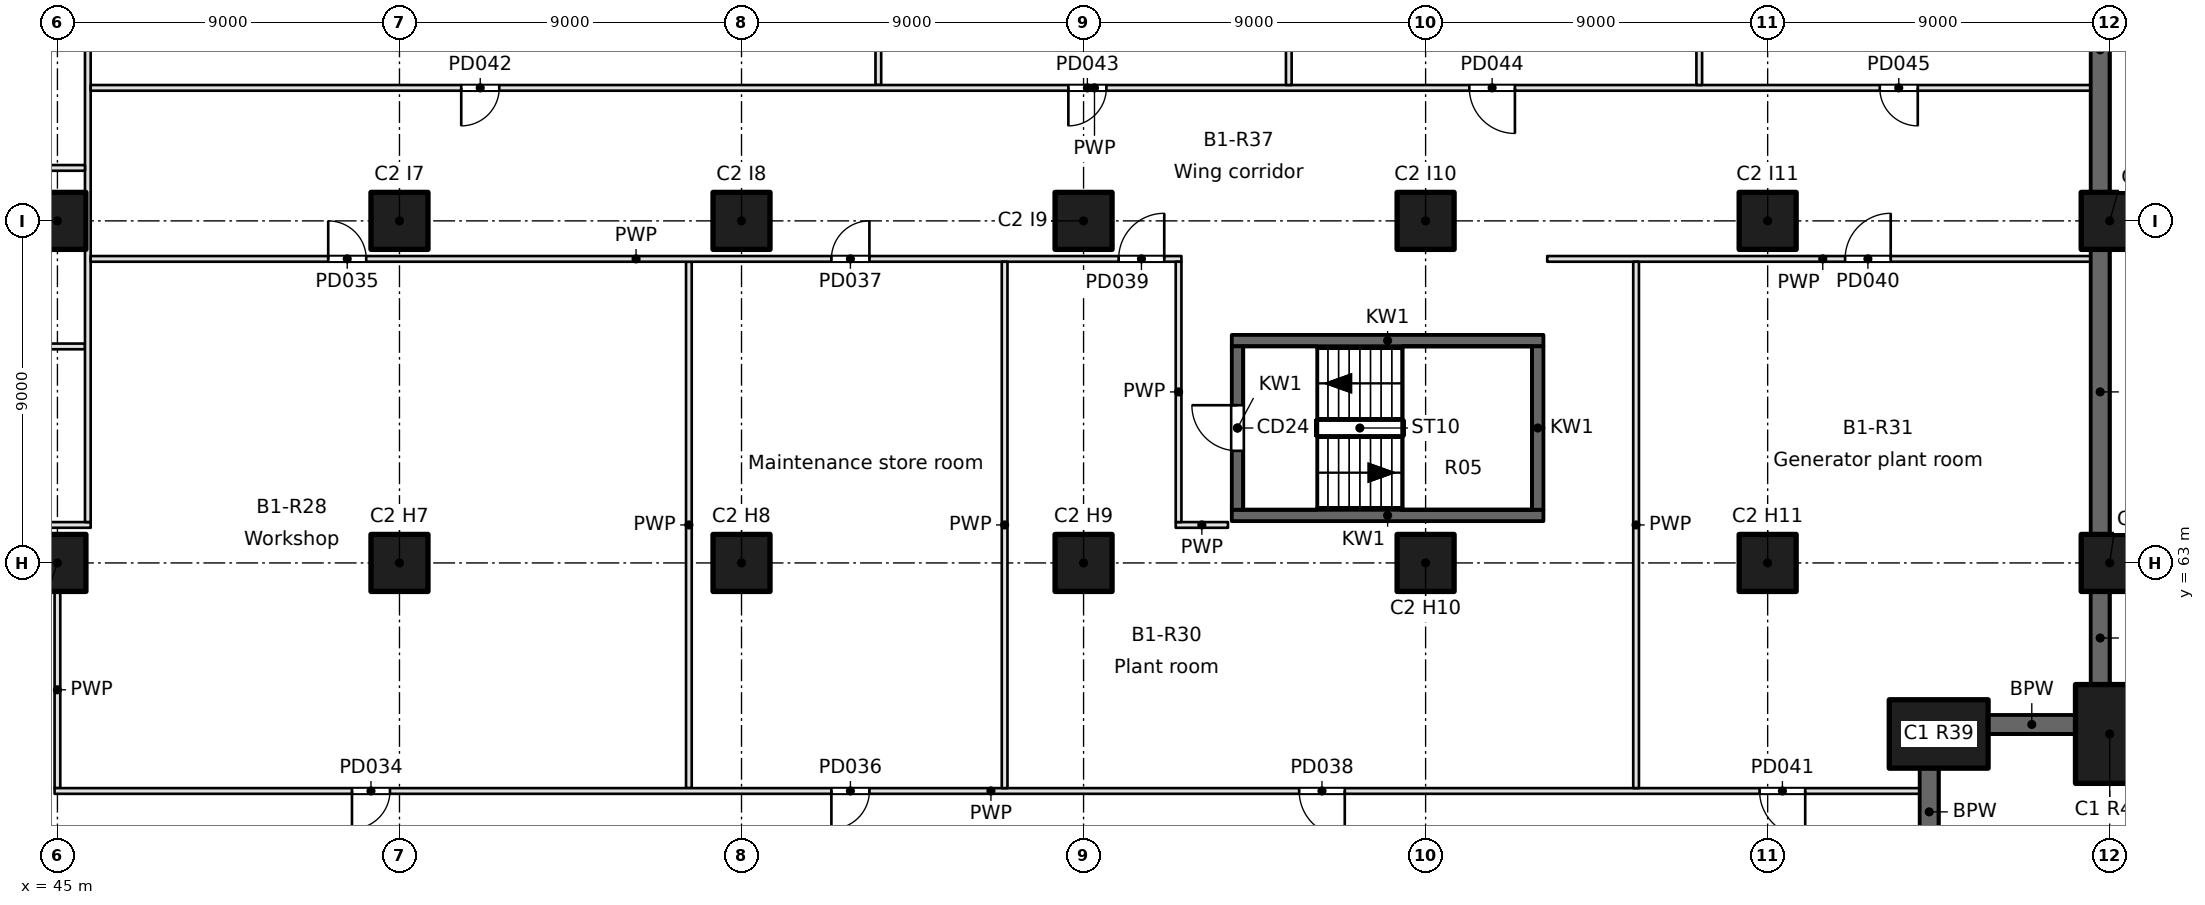
"""IFC4 building model, lengths in metres.
Left out: names, types, materials, properties, quantities, classifications, styles, units other than length and angle.
Written with IfcOpenShell. Run it as: python <this file> out.ifc"""

import sys

from ifc_helpers import new_model, si_unit, direction, frame, frame_2d, origin, origin_2d, place, context, subcontext, project, spatial, rectangle, extrude, element, fill, save


model = new_model("IFC4")
c1 = context("Model", 3, precision=1e-05, world=origin(), true_north=direction((0.0, 1.0)))
c2 = subcontext(c1, "Body", "Model", "MODEL_VIEW")
j1 = project(units=[si_unit("LENGTHUNIT", "METRE"), si_unit("PLANEANGLEUNIT", "RADIAN")], contexts=[c1])
p1 = place(None, origin())
s1 = spatial("IfcSite", under=j1, at=p1, CompositionType="ELEMENT")
p2 = place(p1, origin())
s2 = spatial("IfcBuilding", under=s1, at=p2, CompositionType="ELEMENT")
p3 = place(p2, frame((0.0, 0.0, -6.0)))
s3 = spatial("IfcBuildingStorey", under=s2, at=p3, CompositionType="ELEMENT", Elevation=-6.0)
for number, where, z_axis, x_axis in (
    (1, (94.5, 58.5, -0.6), (0.0, 0.0, 1.0), (1.0, 0.0, 0.0)),
    (2, (99.0, 58.5, -0.6), (0.0, 0.0, 1.0), (0.0, 1.0, 0.0)),
):
    element("IfcColumn", number, at=place(p3, frame(where, z_axis=z_axis, x_axis=x_axis)), inside=s3, PredefinedType="COLUMN", context=c2, shape_type="SweptSolid", body=[
        extrude(rectangle(XDim=2.6, YDim=1.8, at=origin_2d()), origin(), (0.0, 0.0, 1.0), 6.6),
    ])
for number, where, z_axis, x_axis in (
    (3, (99.0, 63.0, -0.6), (0.0, 0.0, 1.0), (1.0, 0.0, 0.0)),
    (4, (99.0, 72.0, -0.6), (0.0, 0.0, 1.0), (1.0, 0.0, 0.0)),
    (5, (45.0, 63.0, -0.6), (0.0, 0.0, 1.0), (1.0, 0.0, 0.0)),
    (6, (45.0, 72.0, -0.6), (0.0, 0.0, 1.0), (1.0, 0.0, 0.0)),
    (7, (54.0, 63.0, -0.6), (0.0, 0.0, 1.0), (1.0, 0.0, 0.0)),
    (8, (54.0, 72.0, -0.6), (0.0, 0.0, 1.0), (1.0, 0.0, 0.0)),
    (9, (63.0, 63.0, -0.6), (0.0, 0.0, 1.0), (1.0, 0.0, 0.0)),
    (10, (63.0, 72.0, -0.6), (0.0, 0.0, 1.0), (1.0, 0.0, 0.0)),
    (11, (72.0, 63.0, -0.6), (0.0, 0.0, 1.0), (1.0, 0.0, 0.0)),
    (12, (72.0, 72.0, -0.6), (0.0, 0.0, 1.0), (1.0, 0.0, 0.0)),
    (13, (81.0, 63.0, -0.6), (0.0, 0.0, 1.0), (1.0, 0.0, 0.0)),
    (14, (81.0, 72.0, -0.6), (0.0, 0.0, 1.0), (1.0, 0.0, 0.0)),
    (15, (90.0, 63.0, -0.6), (0.0, 0.0, 1.0), (1.0, 0.0, 0.0)),
    (16, (90.0, 72.0, -0.6), (0.0, 0.0, 1.0), (1.0, 0.0, 0.0)),
):
    element("IfcColumn", number, at=place(p3, frame(where, z_axis=z_axis, x_axis=x_axis)), inside=s3, PredefinedType="COLUMN", context=c2, shape_type="SweptSolid", body=[
        extrude(rectangle(XDim=1.5, YDim=1.5, at=origin_2d()), origin(), (0.0, 0.0, 1.0), 6.6),
    ])
for number, where, z_axis, x_axis in (
    (17, (75.9, 64.25, 0.0), (0.0, 0.0, 1.0), (1.0, 0.0, 0.0)),
    (18, (75.9, 68.85, 0.0), (0.0, 0.0, 1.0), (1.0, 0.0, 0.0)),
):
    element("IfcWall", number, at=place(p3, frame(where, z_axis=z_axis, x_axis=x_axis)), inside=s3, PredefinedType="SOLIDWALL", context=c2, shape_type="SweptSolid", body=[
        extrude(rectangle(XDim=8.2, YDim=0.3, at=frame_2d((4.1, 0.0))), origin(), (0.0, 0.0, 1.0), 5.6),
    ])
p4 = place(p3, frame((76.05, 64.4, 0.0), z_axis=(0.0, 0.0, 1.0), x_axis=(0.0, 1.0, 0.0)))
e19 = element("IfcWall", 19, at=p4, inside=s3, PredefinedType="SOLIDWALL", context=c2, shape_type="SweptSolid", body=[
    extrude(rectangle(XDim=4.3, YDim=0.3, at=frame_2d((2.15, 0.0))), origin(), (0.0, 0.0, 1.0), 5.6),
])
p5 = place(p4, frame((1.55, 0.0, 0.0)))
e20 = element("IfcOpeningElement", 20, at=p5, cuts=e19, PredefinedType="OPENING", context=c2, shape_type="SweptSolid", body=[
    extrude(rectangle(XDim=1.2, YDim=2.1, at=frame_2d((0.6, 1.05))), frame((0.0, 0.15, 0.0), z_axis=(0.0, -1.0, 0.0), x_axis=(1.0, 0.0, 0.0)), (0.0, 0.0, 1.0), 0.3),
])
p6 = place(p3, frame((83.95, 64.4, 0.0), z_axis=(0.0, 0.0, 1.0), x_axis=(0.0, 1.0, 0.0)))
e21 = element("IfcWall", 21, at=p6, inside=s3, PredefinedType="SOLIDWALL", context=c2, shape_type="SweptSolid", body=[
    extrude(rectangle(XDim=4.3, YDim=0.3, at=frame_2d((2.15, 0.0))), origin(), (0.0, 0.0, 1.0), 5.6),
])
for number, where, z_axis, x_axis in (
    (22, (94.25, 55.3, 0.0), (0.0, 0.0, 1.0), (0.0, 1.0, 0.0)),
    (23, (95.8, 58.75, 0.0), (0.0, 0.0, 1.0), (1.0, 0.0, 0.0)),
):
    element("IfcWall", number, at=place(p3, frame(where, z_axis=z_axis, x_axis=x_axis)), inside=s3, PredefinedType="SOLIDWALL", context=c2, shape_type="SweptSolid", body=[
        extrude(rectangle(XDim=2.3, YDim=0.5, at=frame_2d((1.15, 0.0))), origin(), (0.0, 0.0, 1.0), 5.6),
    ])
p7 = place(p3, frame((98.75, 59.8, 0.0), z_axis=(0.0, 0.0, 1.0), x_axis=(0.0, 1.0, 0.0)))
e24 = element("IfcWall", 24, at=p7, inside=s3, PredefinedType="SOLIDWALL", context=c2, shape_type="SweptSolid", body=[
    extrude(rectangle(XDim=2.45, YDim=0.5, at=frame_2d((1.225, 0.0))), origin(), (0.0, 0.0, 1.0), 5.6),
])
for number, where, z_axis, x_axis in (
    (25, (98.75, 63.75, 0.0), (0.0, 0.0, 1.0), (0.0, 1.0, 0.0)),
    (26, (98.75, 72.75, 0.0), (0.0, 0.0, 1.0), (0.0, 1.0, 0.0)),
):
    element("IfcWall", number, at=place(p3, frame(where, z_axis=z_axis, x_axis=x_axis)), inside=s3, PredefinedType="SOLIDWALL", context=c2, shape_type="SweptSolid", body=[
        extrude(rectangle(XDim=7.5, YDim=0.5, at=frame_2d((3.75, 0.0))), origin(), (0.0, 0.0, 1.0), 5.6),
    ])
p8 = place(p3, frame((45.0, 57.075, 0.0), z_axis=(0.0, 0.0, 1.0), x_axis=(0.0, 1.0, 0.0)))
e27 = element("IfcWall", 27, at=p8, inside=s3, PredefinedType="PARTITIONING", context=c2, shape_type="SweptSolid", body=[
    extrude(rectangle(XDim=5.175, YDim=0.15, at=frame_2d((2.587, 0.0))), origin(), (0.0, 0.0, 1.0), 5.6),
])
p9 = place(p3, frame((40.575, 68.697, 0.0), z_axis=(0.0, 0.0, 1.0), x_axis=(1.0, 0.0, 0.0)))
e28 = element("IfcWall", 28, at=p9, inside=s3, PredefinedType="PARTITIONING", context=c2, shape_type="SweptSolid", body=[
    extrude(rectangle(XDim=5.15, YDim=0.15, at=frame_2d((2.575, 0.0))), origin(), (0.0, 0.0, 1.0), 5.6),
])
p10 = place(p3, frame((45.875, 64.0, 0.0), z_axis=(0.0, 0.0, 1.0), x_axis=(-1.0, 0.0, 0.0)))
e29 = element("IfcWall", 29, at=p10, inside=s3, PredefinedType="PARTITIONING", context=c2, shape_type="SweptSolid", body=[
    extrude(rectangle(XDim=5.45, YDim=0.15, at=frame_2d((2.725, 0.0))), origin(), (0.0, 0.0, 1.0), 5.6),
])
p11 = place(p3, frame((74.425, 64.0, 0.0), z_axis=(0.0, 0.0, 1.0), x_axis=(1.0, 0.0, 0.0)))
e30 = element("IfcWall", 30, at=p11, inside=s3, PredefinedType="PARTITIONING", context=c2, shape_type="SweptSolid", body=[
    extrude(rectangle(XDim=1.375, YDim=0.15, at=frame_2d((0.688, 0.0))), origin(), (0.0, 0.0, 1.0), 5.6),
])
p12 = place(p3, frame((45.8, 64.075, 0.0), z_axis=(0.0, 0.0, 1.0), x_axis=(0.0, 1.0, 0.0)))
e31 = element("IfcWall", 31, at=p12, inside=s3, PredefinedType="PARTITIONING", context=c2, shape_type="SweptSolid", body=[
    extrude(rectangle(XDim=34.025, YDim=0.15, at=frame_2d((17.013, 0.0))), origin(), (0.0, 0.0, 1.0), 5.6),
])
p13 = place(p3, frame((40.575, 73.394, 0.0), z_axis=(0.0, 0.0, 1.0), x_axis=(1.0, 0.0, 0.0)))
e32 = element("IfcWall", 32, at=p13, inside=s3, PredefinedType="PARTITIONING", context=c2, shape_type="SweptSolid", body=[
    extrude(rectangle(XDim=5.15, YDim=0.15, at=frame_2d((2.575, 0.0))), origin(), (0.0, 0.0, 1.0), 5.6),
])
p14 = place(p3, frame((61.615, 57.075, 0.0), z_axis=(0.0, 0.0, 1.0), x_axis=(0.0, 1.0, 0.0)))
e33 = element("IfcWall", 33, at=p14, inside=s3, PredefinedType="PARTITIONING", context=c2, shape_type="SweptSolid", body=[
    extrude(rectangle(XDim=13.85, YDim=0.15, at=frame_2d((6.925, 0.0))), origin(), (0.0, 0.0, 1.0), 5.6),
])
p15 = place(p3, frame((94.2, 57.0, 0.0), z_axis=(0.0, 0.0, 1.0), x_axis=(-1.0, 0.0, 0.0)))
e34 = element("IfcWall", 34, at=p15, inside=s3, PredefinedType="PARTITIONING", context=c2, shape_type="SweptSolid", body=[
    extrude(rectangle(XDim=49.275, YDim=0.15, at=frame_2d((24.637, 0.0))), origin(), (0.0, 0.0, 1.0), 5.6),
])
p16 = place(p15, frame((40.45, 0.0, 0.0)))
e35 = element("IfcOpeningElement", 35, at=p16, cuts=e34, PredefinedType="OPENING", context=c2, shape_type="SweptSolid", body=[
    extrude(rectangle(XDim=1.0, YDim=2.1, at=frame_2d((0.5, 1.05))), frame((0.0, 0.075, 0.0), z_axis=(0.0, -1.0, 0.0), x_axis=(1.0, 0.0, 0.0)), (0.0, 0.0, 1.0), 0.15),
])
p17 = place(p15, frame((27.835, 0.0, 0.0)))
e36 = element("IfcOpeningElement", 36, at=p17, cuts=e34, PredefinedType="OPENING", context=c2, shape_type="SweptSolid", body=[
    extrude(rectangle(XDim=1.0, YDim=2.1, at=frame_2d((0.5, 1.05))), frame((0.0, 0.075, 0.0), z_axis=(0.0, -1.0, 0.0), x_axis=(1.0, 0.0, 0.0)), (0.0, 0.0, 1.0), 0.15),
])
p18 = place(p15, frame((15.327, 0.0, 0.0)))
e37 = element("IfcOpeningElement", 37, at=p18, cuts=e34, PredefinedType="OPENING", context=c2, shape_type="SweptSolid", body=[
    extrude(rectangle(XDim=1.2, YDim=2.1, at=frame_2d((0.6, 1.05))), frame((0.0, 0.075, 0.0), z_axis=(0.0, -1.0, 0.0), x_axis=(1.0, 0.0, 0.0)), (0.0, 0.0, 1.0), 0.15),
])
p19 = place(p15, frame((3.212, 0.0, 0.0)))
e38 = element("IfcOpeningElement", 38, at=p19, cuts=e34, PredefinedType="OPENING", context=c2, shape_type="SweptSolid", body=[
    extrude(rectangle(XDim=1.2, YDim=2.1, at=frame_2d((0.6, 1.05))), frame((0.0, 0.075, 0.0), z_axis=(0.0, -1.0, 0.0), x_axis=(1.0, 0.0, 0.0)), (0.0, 0.0, 1.0), 0.15),
])
p20 = place(p3, frame((45.875, 71.0, 0.0), z_axis=(0.0, 0.0, 1.0), x_axis=(1.0, 0.0, 0.0)))
e39 = element("IfcWall", 39, at=p20, inside=s3, PredefinedType="PARTITIONING", context=c2, shape_type="SweptSolid", body=[
    extrude(rectangle(XDim=28.7, YDim=0.15, at=frame_2d((14.35, 0.0))), origin(), (0.0, 0.0, 1.0), 5.6),
])
p21 = place(p20, frame((6.25, 0.0, 0.0)))
e40 = element("IfcOpeningElement", 40, at=p21, cuts=e39, PredefinedType="OPENING", context=c2, shape_type="SweptSolid", body=[
    extrude(rectangle(XDim=1.0, YDim=2.1, at=frame_2d((0.5, 1.05))), frame((0.0, 0.075, 0.0), z_axis=(0.0, -1.0, 0.0), x_axis=(1.0, 0.0, 0.0)), (0.0, 0.0, 1.0), 0.15),
])
p22 = place(p20, frame((19.49, 0.0, 0.0)))
e41 = element("IfcOpeningElement", 41, at=p22, cuts=e39, PredefinedType="OPENING", context=c2, shape_type="SweptSolid", body=[
    extrude(rectangle(XDim=1.0, YDim=2.1, at=frame_2d((0.5, 1.05))), frame((0.0, 0.075, 0.0), z_axis=(0.0, -1.0, 0.0), x_axis=(1.0, 0.0, 0.0)), (0.0, 0.0, 1.0), 0.15),
])
p23 = place(p20, frame((27.048, 0.0, 0.0)))
e42 = element("IfcOpeningElement", 42, at=p23, cuts=e39, PredefinedType="OPENING", context=c2, shape_type="SweptSolid", body=[
    extrude(rectangle(XDim=1.2, YDim=2.1, at=frame_2d((0.6, 1.05))), frame((0.0, 0.075, 0.0), z_axis=(0.0, -1.0, 0.0), x_axis=(1.0, 0.0, 0.0)), (0.0, 0.0, 1.0), 0.15),
])
p24 = place(p3, frame((84.2, 71.0, 0.0), z_axis=(0.0, 0.0, 1.0), x_axis=(1.0, 0.0, 0.0)))
e43 = element("IfcWall", 43, at=p24, inside=s3, PredefinedType="PARTITIONING", context=c2, shape_type="SweptSolid", body=[
    extrude(rectangle(XDim=14.5, YDim=0.15, at=frame_2d((7.25, 0.0))), origin(), (0.0, 0.0, 1.0), 5.6),
])
p25 = place(p24, frame((7.838, 0.0, 0.0)))
e44 = element("IfcOpeningElement", 44, at=p25, cuts=e43, PredefinedType="OPENING", context=c2, shape_type="SweptSolid", body=[
    extrude(rectangle(XDim=1.2, YDim=2.1, at=frame_2d((0.6, 1.05))), frame((0.0, 0.075, 0.0), z_axis=(0.0, -1.0, 0.0), x_axis=(1.0, 0.0, 0.0)), (0.0, 0.0, 1.0), 0.15),
])
for number, where, z_axis, x_axis in (
    (45, (69.923, 57.075, 0.0), (0.0, 0.0, 1.0), (0.0, 1.0, 0.0)),
    (46, (86.538, 57.075, 0.0), (0.0, 0.0, 1.0), (0.0, 1.0, 0.0)),
):
    element("IfcWall", number, at=place(p3, frame(where, z_axis=z_axis, x_axis=x_axis)), inside=s3, PredefinedType="PARTITIONING", context=c2, shape_type="SweptSolid", body=[
        extrude(rectangle(XDim=13.85, YDim=0.15, at=frame_2d((6.925, 0.0))), origin(), (0.0, 0.0, 1.0), 5.6),
    ])
p26 = place(p3, frame((74.5, 70.925, 0.0), z_axis=(0.0, 0.0, 1.0), x_axis=(0.0, -1.0, 0.0)))
e47 = element("IfcWall", 47, at=p26, inside=s3, PredefinedType="PARTITIONING", context=c2, shape_type="SweptSolid", body=[
    extrude(rectangle(XDim=6.85, YDim=0.15, at=frame_2d((3.425, 0.0))), origin(), (0.0, 0.0, 1.0), 5.6),
])
p27 = place(p3, frame((66.6, 75.575, 0.0), z_axis=(0.0, 0.0, 1.0), x_axis=(0.0, 1.0, 0.0)))
e48 = element("IfcWall", 48, at=p27, inside=s3, PredefinedType="PARTITIONING", context=c2, shape_type="SweptSolid", body=[
    extrude(rectangle(XDim=22.525, YDim=0.15, at=frame_2d((11.263, 0.0))), origin(), (0.0, 0.0, 1.0), 5.6),
])
p28 = place(p3, frame((98.7, 75.5, 0.0), z_axis=(0.0, 0.0, 1.0), x_axis=(-1.0, 0.0, 0.0)))
e49 = element("IfcWall", 49, at=p28, inside=s3, PredefinedType="PARTITIONING", context=c2, shape_type="SweptSolid", body=[
    extrude(rectangle(XDim=52.825, YDim=0.15, at=frame_2d((26.413, 0.0))), origin(), (0.0, 0.0, 1.0), 5.6),
])
p29 = place(p28, frame((42.075, 0.0, 0.0)))
e50 = element("IfcOpeningElement", 50, at=p29, cuts=e49, PredefinedType="OPENING", context=c2, shape_type="SweptSolid", body=[
    extrude(rectangle(XDim=1.0, YDim=2.1, at=frame_2d((0.5, 1.05))), frame((0.0, 0.075, 0.0), z_axis=(0.0, -1.0, 0.0), x_axis=(1.0, 0.0, 0.0)), (0.0, 0.0, 1.0), 0.15),
])
p30 = place(p28, frame((26.1, 0.0, 0.0)))
e51 = element("IfcOpeningElement", 51, at=p30, cuts=e49, PredefinedType="OPENING", context=c2, shape_type="SweptSolid", body=[
    extrude(rectangle(XDim=1.0, YDim=2.1, at=frame_2d((0.5, 1.05))), frame((0.0, 0.075, 0.0), z_axis=(0.0, -1.0, 0.0), x_axis=(1.0, 0.0, 0.0)), (0.0, 0.0, 1.0), 0.15),
])
p31 = place(p28, frame((15.35, 0.0, 0.0)))
e52 = element("IfcOpeningElement", 52, at=p31, cuts=e49, PredefinedType="OPENING", context=c2, shape_type="SweptSolid", body=[
    extrude(rectangle(XDim=1.2, YDim=2.1, at=frame_2d((0.6, 1.05))), frame((0.0, 0.075, 0.0), z_axis=(0.0, -1.0, 0.0), x_axis=(1.0, 0.0, 0.0)), (0.0, 0.0, 1.0), 0.15),
])
p32 = place(p28, frame((4.75, 0.0, 0.0)))
e53 = element("IfcOpeningElement", 53, at=p32, cuts=e49, PredefinedType="OPENING", context=c2, shape_type="SweptSolid", body=[
    extrude(rectangle(XDim=1.0, YDim=2.1, at=frame_2d((0.5, 1.05))), frame((0.0, 0.075, 0.0), z_axis=(0.0, -1.0, 0.0), x_axis=(1.0, 0.0, 0.0)), (0.0, 0.0, 1.0), 0.15),
])
p33 = place(p3, frame((77.4, 75.575, 0.0), z_axis=(0.0, 0.0, 1.0), x_axis=(0.0, 1.0, 0.0)))
e54 = element("IfcWall", 54, at=p33, inside=s3, PredefinedType="PARTITIONING", context=c2, shape_type="SweptSolid", body=[
    extrude(rectangle(XDim=22.525, YDim=0.15, at=frame_2d((11.263, 0.0))), origin(), (0.0, 0.0, 1.0), 5.6),
])
p34 = place(p3, frame((88.2, 75.575, 0.0), z_axis=(0.0, 0.0, 1.0), x_axis=(0.0, 1.0, 0.0)))
e55 = element("IfcWall", 55, at=p34, inside=s3, PredefinedType="PARTITIONING", context=c2, shape_type="SweptSolid", body=[
    extrude(rectangle(XDim=17.925, YDim=0.15, at=frame_2d((8.962, 0.0))), origin(), (0.0, 0.0, 1.0), 5.6),
])
p35 = place(p5, origin())
e56 = element("IfcDoor", 56, at=p35, inside=s3, OperationType="SINGLE_SWING_RIGHT", PredefinedType="DOOR", context=c2, shape_type="SweptSolid", body=[
    extrude(rectangle(XDim=1.2, YDim=2.1, at=frame_2d((0.6, 1.05))), frame((0.0, 0.025, 0.0), z_axis=(0.0, -1.0, 0.0), x_axis=(1.0, 0.0, 0.0)), (0.0, 0.0, 1.0), 0.05),
])
fill(e20, e56)
p36 = place(p16, origin())
e57 = element("IfcDoor", 57, at=p36, inside=s3, OperationType="SINGLE_SWING_RIGHT", PredefinedType="DOOR", context=c2, shape_type="SweptSolid", body=[
    extrude(rectangle(XDim=1.0, YDim=2.1, at=frame_2d((0.5, 1.05))), frame((0.0, 0.025, 0.0), z_axis=(0.0, -1.0, 0.0), x_axis=(1.0, 0.0, 0.0)), (0.0, 0.0, 1.0), 0.05),
])
fill(e35, e57)
p37 = place(p21, origin())
e58 = element("IfcDoor", 58, at=p37, inside=s3, OperationType="SINGLE_SWING_LEFT", PredefinedType="DOOR", context=c2, shape_type="SweptSolid", body=[
    extrude(rectangle(XDim=1.0, YDim=2.1, at=frame_2d((0.5, 1.05))), frame((0.0, 0.025, 0.0), z_axis=(0.0, -1.0, 0.0), x_axis=(1.0, 0.0, 0.0)), (0.0, 0.0, 1.0), 0.05),
])
fill(e40, e58)
p38 = place(p17, origin())
e59 = element("IfcDoor", 59, at=p38, inside=s3, OperationType="SINGLE_SWING_RIGHT", PredefinedType="DOOR", context=c2, shape_type="SweptSolid", body=[
    extrude(rectangle(XDim=1.0, YDim=2.1, at=frame_2d((0.5, 1.05))), frame((0.0, 0.025, 0.0), z_axis=(0.0, -1.0, 0.0), x_axis=(1.0, 0.0, 0.0)), (0.0, 0.0, 1.0), 0.05),
])
fill(e36, e59)
p39 = place(p22, origin())
e60 = element("IfcDoor", 60, at=p39, inside=s3, OperationType="SINGLE_SWING_RIGHT", PredefinedType="DOOR", context=c2, shape_type="SweptSolid", body=[
    extrude(rectangle(XDim=1.0, YDim=2.1, at=frame_2d((0.5, 1.05))), frame((0.0, 0.025, 0.0), z_axis=(0.0, -1.0, 0.0), x_axis=(1.0, 0.0, 0.0)), (0.0, 0.0, 1.0), 0.05),
])
fill(e41, e60)
p40 = place(p18, origin())
e61 = element("IfcDoor", 61, at=p40, inside=s3, OperationType="SINGLE_SWING_LEFT", PredefinedType="DOOR", context=c2, shape_type="SweptSolid", body=[
    extrude(rectangle(XDim=1.2, YDim=2.1, at=frame_2d((0.6, 1.05))), frame((0.0, 0.025, 0.0), z_axis=(0.0, -1.0, 0.0), x_axis=(1.0, 0.0, 0.0)), (0.0, 0.0, 1.0), 0.05),
])
fill(e37, e61)
p41 = place(p23, origin())
e62 = element("IfcDoor", 62, at=p41, inside=s3, OperationType="SINGLE_SWING_RIGHT", PredefinedType="DOOR", context=c2, shape_type="SweptSolid", body=[
    extrude(rectangle(XDim=1.2, YDim=2.1, at=frame_2d((0.6, 1.05))), frame((0.0, 0.025, 0.0), z_axis=(0.0, -1.0, 0.0), x_axis=(1.0, 0.0, 0.0)), (0.0, 0.0, 1.0), 0.05),
])
fill(e42, e62)
p42 = place(p25, origin())
e63 = element("IfcDoor", 63, at=p42, inside=s3, OperationType="SINGLE_SWING_RIGHT", PredefinedType="DOOR", context=c2, shape_type="SweptSolid", body=[
    extrude(rectangle(XDim=1.2, YDim=2.1, at=frame_2d((0.6, 1.05))), frame((0.0, 0.025, 0.0), z_axis=(0.0, -1.0, 0.0), x_axis=(1.0, 0.0, 0.0)), (0.0, 0.0, 1.0), 0.05),
])
fill(e44, e63)
p43 = place(p19, origin())
e64 = element("IfcDoor", 64, at=p43, inside=s3, OperationType="SINGLE_SWING_LEFT", PredefinedType="DOOR", context=c2, shape_type="SweptSolid", body=[
    extrude(rectangle(XDim=1.2, YDim=2.1, at=frame_2d((0.6, 1.05))), frame((0.0, 0.025, 0.0), z_axis=(0.0, -1.0, 0.0), x_axis=(1.0, 0.0, 0.0)), (0.0, 0.0, 1.0), 0.05),
])
fill(e38, e64)
p44 = place(p29, origin())
e65 = element("IfcDoor", 65, at=p44, inside=s3, OperationType="SINGLE_SWING_RIGHT", PredefinedType="DOOR", context=c2, shape_type="SweptSolid", body=[
    extrude(rectangle(XDim=1.0, YDim=2.1, at=frame_2d((0.5, 1.05))), frame((0.0, 0.025, 0.0), z_axis=(0.0, -1.0, 0.0), x_axis=(1.0, 0.0, 0.0)), (0.0, 0.0, 1.0), 0.05),
])
fill(e50, e65)
p45 = place(p30, origin())
e66 = element("IfcDoor", 66, at=p45, inside=s3, OperationType="SINGLE_SWING_RIGHT", PredefinedType="DOOR", context=c2, shape_type="SweptSolid", body=[
    extrude(rectangle(XDim=1.0, YDim=2.1, at=frame_2d((0.5, 1.05))), frame((0.0, 0.025, 0.0), z_axis=(0.0, -1.0, 0.0), x_axis=(1.0, 0.0, 0.0)), (0.0, 0.0, 1.0), 0.05),
])
fill(e51, e66)
p46 = place(p31, origin())
e67 = element("IfcDoor", 67, at=p46, inside=s3, OperationType="SINGLE_SWING_LEFT", PredefinedType="DOOR", context=c2, shape_type="SweptSolid", body=[
    extrude(rectangle(XDim=1.2, YDim=2.1, at=frame_2d((0.6, 1.05))), frame((0.0, 0.025, 0.0), z_axis=(0.0, -1.0, 0.0), x_axis=(1.0, 0.0, 0.0)), (0.0, 0.0, 1.0), 0.05),
])
fill(e52, e67)
p47 = place(p32, origin())
e68 = element("IfcDoor", 68, at=p47, inside=s3, OperationType="SINGLE_SWING_LEFT", PredefinedType="DOOR", context=c2, shape_type="SweptSolid", body=[
    extrude(rectangle(XDim=1.0, YDim=2.1, at=frame_2d((0.5, 1.05))), frame((0.0, 0.025, 0.0), z_axis=(0.0, -1.0, 0.0), x_axis=(1.0, 0.0, 0.0)), (0.0, 0.0, 1.0), 0.05),
])
fill(e53, e68)
save(model, sys.argv[1])
